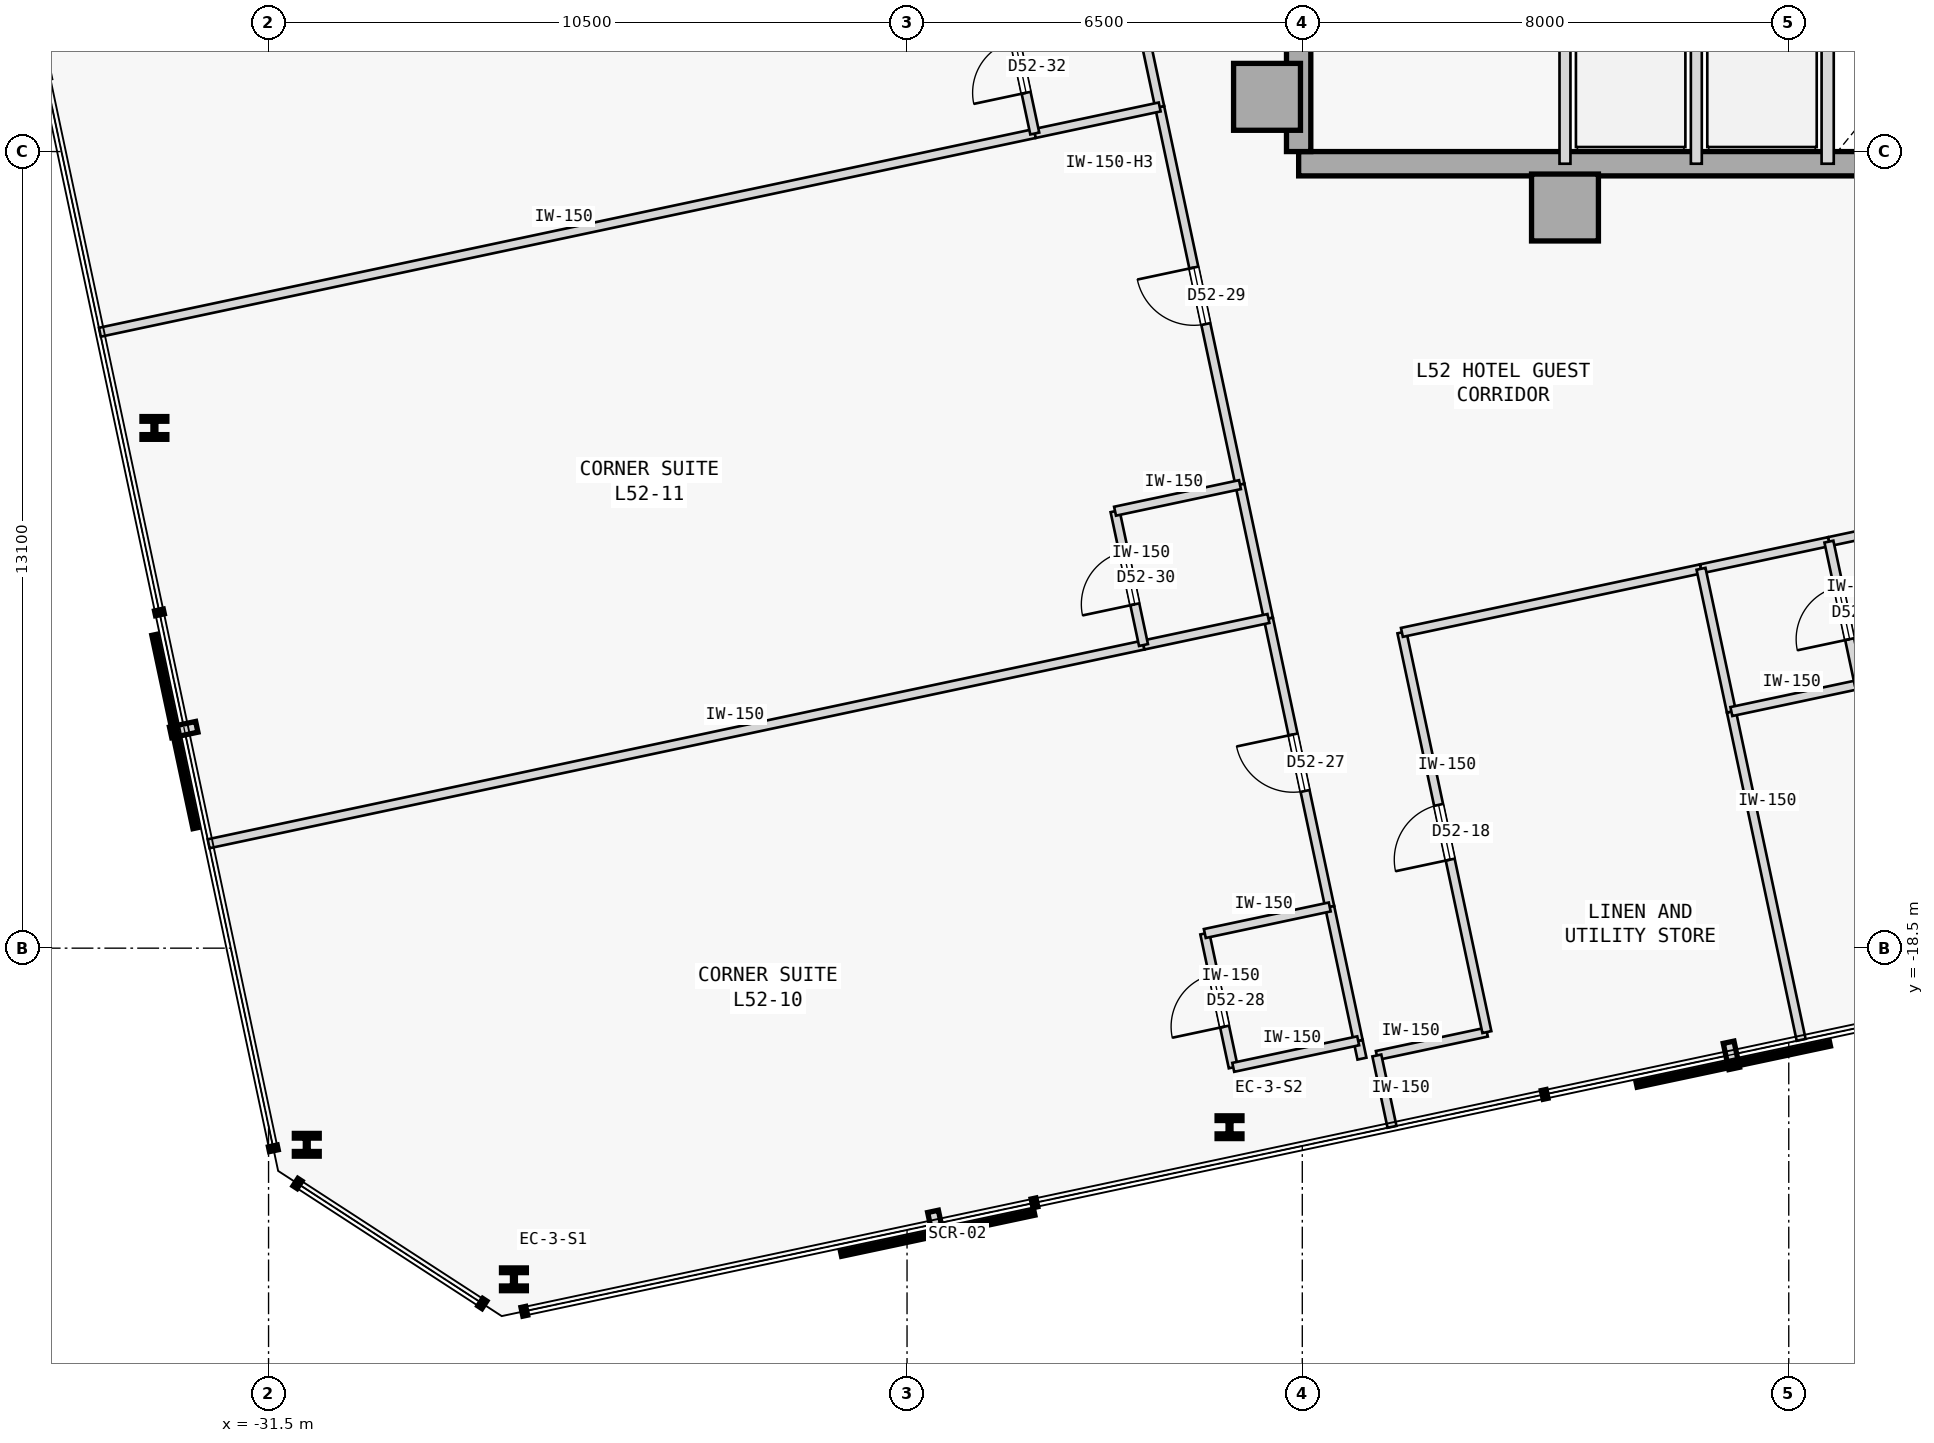
"""IFC4 building model, lengths in metres.
Left out: names, types, materials, properties, quantities, classifications, styles, units other than length and angle.
Written with IfcOpenShell. Run it as: python <this file> out.ifc"""

import sys

from ifc_helpers import new_model, si_unit, direction, frame, frame_2d, origin, origin_2d, place, context, subcontext, project, spatial, rectangle, i_section, extrude, element, fill, save


model = new_model("IFC4")
c1 = context("Model", 3, precision=1e-05, world=origin(), true_north=direction((0.0, 1.0)))
c2 = subcontext(c1, "Body", "Model", "MODEL_VIEW")
j1 = project(units=[si_unit("LENGTHUNIT", "METRE"), si_unit("PLANEANGLEUNIT", "RADIAN")], contexts=[c1])
p1 = place(None, origin())
s1 = spatial("IfcSite", under=j1, at=p1, CompositionType="ELEMENT")
p2 = place(p1, origin())
s2 = spatial("IfcBuilding", under=s1, at=p2, CompositionType="ELEMENT")
p3 = place(p2, frame((0.0, 0.0, 199.0)))
s3 = spatial("IfcBuildingStorey", under=s2, at=p3, CompositionType="ELEMENT", Elevation=199.0)
for number, where, z_axis, x_axis in (
    (1, (-15.08, -4.5, 0.0), (0.0, 0.0, 1.0), (1.0, 0.0, 0.0)),
    (2, (-10.18, -6.32, 0.0), (0.0, 0.0, 1.0), (1.0, 0.0, 0.0)),
):
    element("IfcColumn", number, at=place(p3, frame(where, z_axis=z_axis, x_axis=x_axis)), inside=s3, PredefinedType="COLUMN", context=c2, shape_type="SweptSolid", body=[
        extrude(rectangle(XDim=1.1, YDim=1.1, at=origin_2d()), origin(), (0.0, 0.0, 1.0), 3.4),
    ])
p4 = place(p3, frame((-14.56, -5.6, 0.0), z_axis=(0.0, 0.0, 1.0), x_axis=(1.0, 0.0, 0.0)))
e3 = element("IfcWall", 3, at=p4, inside=s3, PredefinedType="SHEAR", context=c2, shape_type="SweptSolid", body=[
    extrude(rectangle(XDim=10.86, YDim=0.4, at=frame_2d((5.43, 0.0))), origin(), (0.0, 0.0, 1.0), 3.0),
])
p5 = place(p3, frame((-14.56, -5.4, 0.0), z_axis=(0.0, 0.0, 1.0), x_axis=(0.0, 1.0, 0.0)))
e4 = element("IfcWall", 4, at=p5, inside=s3, PredefinedType="SHEAR", context=c2, shape_type="SweptSolid", body=[
    extrude(rectangle(XDim=10.8, YDim=0.4, at=frame_2d((5.4, 0.0))), origin(), (0.0, 0.0, 1.0), 3.0),
])
for number, where, z_axis, x_axis in (
    (5, (-27.465, -23.946, 0.0), (0.0, 0.0, 1.0), (1.0, 0.0, 0.0)),
    (6, (-15.697, -21.444, 0.0), (0.0, 0.0, 1.0), (1.0, 0.0, 0.0)),
    (7, (-33.377, -9.945, 0.0), (0.0, 0.0, 1.0), (1.0, 0.0, 0.0)),
    (8, (-30.871, -21.733, 0.0), (0.0, 0.0, 1.0), (1.0, 0.0, 0.0)),
):
    element("IfcColumn", number, at=place(p3, frame(where, z_axis=z_axis, x_axis=x_axis)), inside=s3, PredefinedType="COLUMN", context=c2, shape_type="SweptSolid", body=[
        extrude(i_section(OverallWidth=0.409, OverallDepth=0.374, WebThickness=0.048, FlangeThickness=0.077, FilletRadius=0.015, at=origin_2d()), origin(), (0.0, 0.0, 1.0), 3.4),
    ])
p6 = place(p3, frame((-5.86, -5.6, 0.0), z_axis=(0.0, 0.0, 1.0), x_axis=(0.0, 1.0, 0.0)))
e9 = element("IfcWall", 9, at=p6, inside=s3, PredefinedType="STANDARD", context=c2, shape_type="SweptSolid", body=[
    extrude(rectangle(XDim=2.65, YDim=0.2, at=frame_2d((1.325, 0.0))), origin(), (0.0, 0.0, 1.0), 3.0),
])
for number, where, z_axis, x_axis in (
    (10, (-10.18, -5.6, 0.0), (0.0, 0.0, 1.0), (0.0, 1.0, 0.0)),
    (11, (-8.02, -5.6, 0.0), (0.0, 0.0, 1.0), (0.0, 1.0, 0.0)),
):
    element("IfcWall", number, at=place(p3, frame(where, z_axis=z_axis, x_axis=x_axis)), inside=s3, PredefinedType="STANDARD", context=c2, shape_type="SweptSolid", body=[
        extrude(rectangle(XDim=2.65, YDim=0.18, at=frame_2d((1.325, 0.0))), origin(), (0.0, 0.0, 1.0), 3.0),
    ])
p7 = place(p3, frame((-13.274, -20.265, 0.0), z_axis=(0.0, 0.0, 1.0), x_axis=(0.978160192495, 0.207852442415, 0.0)))
e12 = element("IfcWall", 12, at=p7, inside=s3, PredefinedType="PARTITIONING", context=c2, shape_type="SweptSolid", body=[
    extrude(rectangle(XDim=1.85, YDim=0.15, at=frame_2d((0.925, 0.0))), origin(), (0.0, 0.0, 1.0), 3.0),
])
p8 = place(p3, frame((-11.465, -19.88, 0.0), z_axis=(0.0, 0.0, 1.0), x_axis=(-0.207916109912, 0.978146661416, 0.0)))
e13 = element("IfcWall", 13, at=p8, inside=s3, PredefinedType="PARTITIONING", context=c2, shape_type="SweptSolid", body=[
    extrude(rectangle(XDim=6.72, YDim=0.15, at=frame_2d((3.36, 0.0))), origin(), (0.0, 0.0, 1.0), 3.0),
])
p9 = place(p8, frame((2.9, 0.0, 0.0)))
e14 = element("IfcOpeningElement", 14, at=p9, cuts=e13, PredefinedType="OPENING", context=c2, shape_type="SweptSolid", body=[
    extrude(rectangle(XDim=0.92, YDim=2.15, at=frame_2d((0.46, 1.075))), frame((0.0, 0.085, 0.0), z_axis=(0.0, -1.0, 0.0), x_axis=(1.0, 0.0, 0.0)), (0.0, 0.0, 1.0), 0.17),
])
p10 = place(p3, frame((-12.862, -13.307, 0.0), z_axis=(0.0, 0.0, 1.0), x_axis=(0.978145647498, 0.207920879857, 0.0)))
e15 = element("IfcWall", 15, at=p10, inside=s3, PredefinedType="PARTITIONING", context=c2, shape_type="SweptSolid", body=[
    extrude(rectangle(XDim=5.029, YDim=0.15, at=frame_2d((2.515, 0.0))), origin(), (0.0, 0.0, 1.0), 3.0),
])
p11 = place(p3, frame((-5.84, -11.814, 0.0), z_axis=(0.0, 0.0, 1.0), x_axis=(0.978148615161, 0.207906918255, 0.0)))
e16 = element("IfcWall", 16, at=p11, inside=s3, PredefinedType="PARTITIONING", context=c2, shape_type="SweptSolid", body=[
    extrude(rectangle(XDim=4.729, YDim=0.15, at=frame_2d((2.364, 0.0))), origin(), (0.0, 0.0, 1.0), 3.0),
])
p12 = place(p11, frame((1.905, 0.0, 0.0)))
e17 = element("IfcOpeningElement", 17, at=p12, cuts=e16, PredefinedType="OPENING", context=c2, shape_type="SweptSolid", body=[
    extrude(rectangle(XDim=0.92, YDim=2.15, at=frame_2d((0.46, 1.075))), frame((0.0, 0.085, 0.0), z_axis=(0.0, -1.0, 0.0), x_axis=(1.0, 0.0, 0.0)), (0.0, 0.0, 1.0), 0.17),
])
p13 = place(p3, frame((-7.943, -12.261, 0.0), z_axis=(0.0, 0.0, 1.0), x_axis=(0.978146728319, 0.207915795165, 0.0)))
e18 = element("IfcWall", 18, at=p13, inside=s3, PredefinedType="PARTITIONING", context=c2, shape_type="SweptSolid", body=[
    extrude(rectangle(XDim=2.15, YDim=0.15, at=frame_2d((1.075, 0.0))), origin(), (0.0, 0.0, 1.0), 3.0),
])
p14 = place(p3, frame((-13.519, -20.317, 0.0), z_axis=(0.0, 0.0, 1.0), x_axis=(-0.207527808066, 0.978229118806, 0.0)))
e19 = element("IfcWall", 19, at=p14, inside=s3, PredefinedType="PARTITIONING", context=c2, shape_type="SweptSolid", body=[
    extrude(rectangle(XDim=0.3, YDim=0.15, at=frame_2d((0.15, 0.0))), origin(), (0.0, 0.0, 1.0), 3.0),
])
p15 = place(p3, frame((-14.049, -17.823, 0.0), z_axis=(0.0, 0.0, 1.0), x_axis=(-0.2079027059, 0.978149510494, 0.0)))
e20 = element("IfcWall", 20, at=p15, inside=s3, PredefinedType="PARTITIONING", context=c2, shape_type="SweptSolid", body=[
    extrude(rectangle(XDim=4.85, YDim=0.15, at=frame_2d((2.425, 0.0))), origin(), (0.0, 0.0, 1.0), 3.0),
])
p16 = place(p15, frame((1.95, 0.0, 0.0)))
e21 = element("IfcOpeningElement", 21, at=p16, cuts=e20, PredefinedType="OPENING", context=c2, shape_type="SweptSolid", body=[
    extrude(rectangle(XDim=0.95, YDim=2.15, at=frame_2d((0.475, 1.075))), frame((0.0, 0.085, 0.0), z_axis=(0.0, -1.0, 0.0), x_axis=(1.0, 0.0, 0.0)), (0.0, 0.0, 1.0), 0.17),
])
p17 = place(p3, frame((-13.581, -20.023, 0.0), z_axis=(0.0, 0.0, 1.0), x_axis=(-0.207891197838, 0.978151956427, 0.0)))
e22 = element("IfcWall", 22, at=p17, inside=s3, PredefinedType="PARTITIONING", context=c2, shape_type="SweptSolid", body=[
    extrude(rectangle(XDim=2.25, YDim=0.15, at=frame_2d((1.125, 0.0))), origin(), (0.0, 0.0, 1.0), 3.0),
])
p18 = place(p3, frame((-15.525, -10.878, 0.0), z_axis=(0.0, 0.0, 1.0), x_axis=(-0.207887725283, 0.978152694459, 0.0)))
e23 = element("IfcWall", 23, at=p18, inside=s3, PredefinedType="PARTITIONING", context=c2, shape_type="SweptSolid", body=[
    extrude(rectangle(XDim=6.35, YDim=0.15, at=frame_2d((3.175, 0.0))), origin(), (0.0, 0.0, 1.0), 3.0),
])
p19 = place(p18, frame((2.7, 0.0, 0.0)))
e24 = element("IfcOpeningElement", 24, at=p19, cuts=e23, PredefinedType="OPENING", context=c2, shape_type="SweptSolid", body=[
    extrude(rectangle(XDim=0.95, YDim=2.15, at=frame_2d((0.475, 1.075))), frame((0.0, 0.085, 0.0), z_axis=(0.0, -1.0, 0.0), x_axis=(1.0, 0.0, 0.0)), (0.0, 0.0, 1.0), 0.17),
])
p20 = place(p3, frame((-15.057, -13.079, 0.0), z_axis=(0.0, 0.0, 1.0), x_axis=(-0.207995007687, 0.978129887478, 0.0)))
e25 = element("IfcWall", 25, at=p20, inside=s3, PredefinedType="PARTITIONING", context=c2, shape_type="SweptSolid", body=[
    extrude(rectangle(XDim=2.25, YDim=0.15, at=frame_2d((1.125, 0.0))), origin(), (0.0, 0.0, 1.0), 3.0),
])
p21 = place(p3, frame((-16.845, -4.667, 0.0), z_axis=(0.0, 0.0, 1.0), x_axis=(-0.207913264065, 0.978147266328, 0.0)))
e26 = element("IfcWall", 26, at=p21, inside=s3, PredefinedType="PARTITIONING", context=c2, shape_type="SweptSolid", body=[
    extrude(rectangle(XDim=2.25, YDim=0.15, at=frame_2d((1.125, 0.0))), origin(), (0.0, 0.0, 1.0), 3.0),
])
p22 = place(p3, frame((-6.296, -20.008, 0.0), z_axis=(0.0, 0.0, 1.0), x_axis=(-0.20792487872, 0.978144797466, 0.0)))
e27 = element("IfcWall", 27, at=p22, inside=s3, PredefinedType="PARTITIONING", context=c2, shape_type="SweptSolid", body=[
    extrude(rectangle(XDim=5.52, YDim=0.15, at=frame_2d((2.76, 0.0))), origin(), (0.0, 0.0, 1.0), 3.0),
])
p23 = place(p3, frame((-7.444, -14.609, 0.0), z_axis=(0.0, 0.0, 1.0), x_axis=(-0.207917150959, 0.978146440129, 0.0)))
e28 = element("IfcWall", 28, at=p23, inside=s3, PredefinedType="PARTITIONING", context=c2, shape_type="SweptSolid", body=[
    extrude(rectangle(XDim=2.4, YDim=0.15, at=frame_2d((1.2, 0.0))), origin(), (0.0, 0.0, 1.0), 3.0),
])
p24 = place(p3, frame((-13.025, -21.439, 0.0), z_axis=(0.0, 0.0, 1.0), x_axis=(-0.207917150959, 0.978146440129, 0.0)))
e29 = element("IfcWall", 29, at=p24, inside=s3, PredefinedType="PARTITIONING", context=c2, shape_type="SweptSolid", body=[
    extrude(rectangle(XDim=1.2, YDim=0.15, at=frame_2d((0.6, 0.0))), origin(), (0.0, 0.0, 1.0), 3.0),
])
p25 = place(p3, frame((-7.444, -14.609, 0.0), z_axis=(0.0, 0.0, 1.0), x_axis=(0.978141818715, 0.207938891219, 0.0)))
e30 = element("IfcWall", 30, at=p25, inside=s3, PredefinedType="PARTITIONING", context=c2, shape_type="SweptSolid", body=[
    extrude(rectangle(XDim=2.15, YDim=0.15, at=frame_2d((1.075, 0.0))), origin(), (0.0, 0.0, 1.0), 3.0),
])
p26 = place(p3, frame((-5.341, -14.162, 0.0), z_axis=(0.0, 0.0, 1.0), x_axis=(-0.207819824493, 0.978167123015, 0.0)))
e31 = element("IfcWall", 31, at=p26, inside=s3, PredefinedType="PARTITIONING", context=c2, shape_type="SweptSolid", body=[
    extrude(rectangle(XDim=2.4, YDim=0.15, at=frame_2d((1.2, 0.0))), origin(), (0.0, 0.0, 1.0), 3.0),
])
p27 = place(p26, frame((0.76, 0.0, 0.0)))
e32 = element("IfcOpeningElement", 32, at=p27, cuts=e31, PredefinedType="OPENING", context=c2, shape_type="SweptSolid", body=[
    extrude(rectangle(XDim=0.88, YDim=2.15, at=frame_2d((0.44, 1.075))), frame((0.0, 0.085, 0.0), z_axis=(0.0, -1.0, 0.0), x_axis=(1.0, 0.0, 0.0)), (0.0, 0.0, 1.0), 0.17),
])
p28 = place(p3, frame((-15.635, -20.46, 0.0), z_axis=(0.0, 0.0, 1.0), x_axis=(-0.207913264065, 0.978147266328, 0.0)))
e33 = element("IfcWall", 33, at=p28, inside=s3, PredefinedType="PARTITIONING", context=c2, shape_type="SweptSolid", body=[
    extrude(rectangle(XDim=2.25, YDim=0.15, at=frame_2d((1.125, 0.0))), origin(), (0.0, 0.0, 1.0), 3.0),
])
p29 = place(p28, frame((0.685, 0.0, 0.0)))
e34 = element("IfcOpeningElement", 34, at=p29, cuts=e33, PredefinedType="OPENING", context=c2, shape_type="SweptSolid", body=[
    extrude(rectangle(XDim=0.88, YDim=2.15, at=frame_2d((0.44, 1.075))), frame((0.0, 0.085, 0.0), z_axis=(0.0, -1.0, 0.0), x_axis=(1.0, 0.0, 0.0)), (0.0, 0.0, 1.0), 0.17),
])
for number, where, z_axis, x_axis in (
    (35, (-15.635, -20.46, 0.0), (0.0, 0.0, 1.0), (0.978, 0.208, 0.0)),
    (36, (-16.103, -18.259, 0.0), (0.0, 0.0, 1.0), (0.978, 0.208, 0.0)),
):
    element("IfcWall", number, at=place(p3, frame(where, z_axis=z_axis, x_axis=x_axis)), inside=s3, PredefinedType="PARTITIONING", context=c2, shape_type="SweptSolid", body=[
        extrude(rectangle(XDim=2.1, YDim=0.15, at=frame_2d((1.05, 0.0))), origin(), (0.0, 0.0, 1.0), 3.0),
    ])
p30 = place(p3, frame((-32.486, -16.783, 0.0), z_axis=(0.0, 0.0, 1.0), x_axis=(0.978146137903, 0.207918572776, 0.0)))
e37 = element("IfcWall", 37, at=p30, inside=s3, PredefinedType="PARTITIONING", context=c2, shape_type="SweptSolid", body=[
    extrude(rectangle(XDim=15.718, YDim=0.15, at=frame_2d((7.859, 0.0))), origin(), (0.0, 0.0, 1.0), 3.0),
])
p31 = place(p3, frame((-17.111, -13.515, 0.0), z_axis=(0.0, 0.0, 1.0), x_axis=(0.97815826, 0.207861536591, 0.0)))
e38 = element("IfcWall", 38, at=p31, inside=s3, PredefinedType="PARTITIONING", context=c2, shape_type="SweptSolid", body=[
    extrude(rectangle(XDim=2.1, YDim=0.15, at=frame_2d((1.05, 0.0))), origin(), (0.0, 0.0, 1.0), 3.0),
])
p32 = place(p3, frame((-17.111, -13.515, 0.0), z_axis=(0.0, 0.0, 1.0), x_axis=(-0.207913264065, 0.978147266328, 0.0)))
e39 = element("IfcWall", 39, at=p32, inside=s3, PredefinedType="PARTITIONING", context=c2, shape_type="SweptSolid", body=[
    extrude(rectangle(XDim=2.25, YDim=0.15, at=frame_2d((1.125, 0.0))), origin(), (0.0, 0.0, 1.0), 3.0),
])
p33 = place(p32, frame((0.685, 0.0, 0.0)))
e40 = element("IfcOpeningElement", 40, at=p33, cuts=e39, PredefinedType="OPENING", context=c2, shape_type="SweptSolid", body=[
    extrude(rectangle(XDim=0.88, YDim=2.15, at=frame_2d((0.44, 1.075))), frame((0.0, 0.085, 0.0), z_axis=(0.0, -1.0, 0.0), x_axis=(1.0, 0.0, 0.0)), (0.0, 0.0, 1.0), 0.17),
])
p34 = place(p3, frame((-17.579, -11.314, 0.0), z_axis=(0.0, 0.0, 1.0), x_axis=(0.978129588365, 0.207996414309, 0.0)))
e41 = element("IfcWall", 41, at=p34, inside=s3, PredefinedType="PARTITIONING", context=c2, shape_type="SweptSolid", body=[
    extrude(rectangle(XDim=2.1, YDim=0.15, at=frame_2d((1.05, 0.0))), origin(), (0.0, 0.0, 1.0), 3.0),
])
p35 = place(p3, frame((-34.274, -8.371, 0.0), z_axis=(0.0, 0.0, 1.0), x_axis=(0.978146137903, 0.207918572776, 0.0)))
e42 = element("IfcWall", 42, at=p35, inside=s3, PredefinedType="PARTITIONING", context=c2, shape_type="SweptSolid", body=[
    extrude(rectangle(XDim=15.718, YDim=0.15, at=frame_2d((7.859, 0.0))), origin(), (0.0, 0.0, 1.0), 3.0),
])
p36 = place(p3, frame((-18.899, -5.103, 0.0), z_axis=(0.0, 0.0, 1.0), x_axis=(0.97815826, 0.207861536591, 0.0)))
e43 = element("IfcWall", 43, at=p36, inside=s3, PredefinedType="PARTITIONING", context=c2, shape_type="SweptSolid", body=[
    extrude(rectangle(XDim=2.1, YDim=0.15, at=frame_2d((1.05, 0.0))), origin(), (0.0, 0.0, 1.0), 2.22),
])
p37 = place(p3, frame((-18.899, -5.103, 0.0), z_axis=(0.0, 0.0, 1.0), x_axis=(-0.207913264065, 0.978147266328, 0.0)))
e44 = element("IfcWall", 44, at=p37, inside=s3, PredefinedType="PARTITIONING", context=c2, shape_type="SweptSolid", body=[
    extrude(rectangle(XDim=2.25, YDim=0.15, at=frame_2d((1.125, 0.0))), origin(), (0.0, 0.0, 1.0), 3.0),
])
p38 = place(p37, frame((0.685, 0.0, 0.0)))
e45 = element("IfcOpeningElement", 45, at=p38, cuts=e44, PredefinedType="OPENING", context=c2, shape_type="SweptSolid", body=[
    extrude(rectangle(XDim=0.88, YDim=2.15, at=frame_2d((0.44, 1.075))), frame((0.0, 0.085, 0.0), z_axis=(0.0, -1.0, 0.0), x_axis=(1.0, 0.0, 0.0)), (0.0, 0.0, 1.0), 0.17),
])
p39 = place(p9, origin())
e46 = element("IfcDoor", 46, at=p39, inside=s3, OperationType="SINGLE_SWING_LEFT", PredefinedType="DOOR", context=c2, shape_type="SweptSolid", body=[
    extrude(rectangle(XDim=0.92, YDim=2.15, at=frame_2d((0.46, 1.075))), frame((0.0, 0.025, 0.0), z_axis=(0.0, -1.0, 0.0), x_axis=(1.0, 0.0, 0.0)), (0.0, 0.0, 1.0), 0.05),
])
fill(e14, e46)
p40 = place(p27, origin())
e47 = element("IfcDoor", 47, at=p40, inside=s3, OperationType="SINGLE_SWING_LEFT", PredefinedType="DOOR", context=c2, shape_type="SweptSolid", body=[
    extrude(rectangle(XDim=0.88, YDim=2.15, at=frame_2d((0.44, 1.075))), frame((0.0, 0.025, 0.0), z_axis=(0.0, -1.0, 0.0), x_axis=(1.0, 0.0, 0.0)), (0.0, 0.0, 1.0), 0.05),
])
fill(e32, e47)
p41 = place(p16, origin())
e48 = element("IfcDoor", 48, at=p41, inside=s3, OperationType="SINGLE_SWING_RIGHT", PredefinedType="DOOR", context=c2, shape_type="SweptSolid", body=[
    extrude(rectangle(XDim=0.95, YDim=2.15, at=frame_2d((0.475, 1.075))), frame((0.0, 0.025, 0.0), z_axis=(0.0, -1.0, 0.0), x_axis=(1.0, 0.0, 0.0)), (0.0, 0.0, 1.0), 0.05),
])
fill(e21, e48)
p42 = place(p29, origin())
e49 = element("IfcDoor", 49, at=p42, inside=s3, OperationType="SINGLE_SWING_LEFT", PredefinedType="DOOR", context=c2, shape_type="SweptSolid", body=[
    extrude(rectangle(XDim=0.88, YDim=2.15, at=frame_2d((0.44, 1.075))), frame((0.0, 0.025, 0.0), z_axis=(0.0, -1.0, 0.0), x_axis=(1.0, 0.0, 0.0)), (0.0, 0.0, 1.0), 0.05),
])
fill(e34, e49)
p43 = place(p19, origin())
e50 = element("IfcDoor", 50, at=p43, inside=s3, OperationType="SINGLE_SWING_RIGHT", PredefinedType="DOOR", context=c2, shape_type="SweptSolid", body=[
    extrude(rectangle(XDim=0.95, YDim=2.15, at=frame_2d((0.475, 1.075))), frame((0.0, 0.025, 0.0), z_axis=(0.0, -1.0, 0.0), x_axis=(1.0, 0.0, 0.0)), (0.0, 0.0, 1.0), 0.05),
])
fill(e24, e50)
p44 = place(p33, origin())
e51 = element("IfcDoor", 51, at=p44, inside=s3, OperationType="SINGLE_SWING_LEFT", PredefinedType="DOOR", context=c2, shape_type="SweptSolid", body=[
    extrude(rectangle(XDim=0.88, YDim=2.15, at=frame_2d((0.44, 1.075))), frame((0.0, 0.025, 0.0), z_axis=(0.0, -1.0, 0.0), x_axis=(1.0, 0.0, 0.0)), (0.0, 0.0, 1.0), 0.05),
])
fill(e40, e51)
p45 = place(p38, origin())
e52 = element("IfcDoor", 52, at=p45, inside=s3, OperationType="SINGLE_SWING_LEFT", PredefinedType="DOOR", context=c2, shape_type="SweptSolid", body=[
    extrude(rectangle(XDim=0.88, YDim=2.15, at=frame_2d((0.44, 1.075))), frame((0.0, 0.025, 0.0), z_axis=(0.0, -1.0, 0.0), x_axis=(1.0, 0.0, 0.0)), (0.0, 0.0, 1.0), 0.05),
])
fill(e45, e52)
save(model, sys.argv[1])
